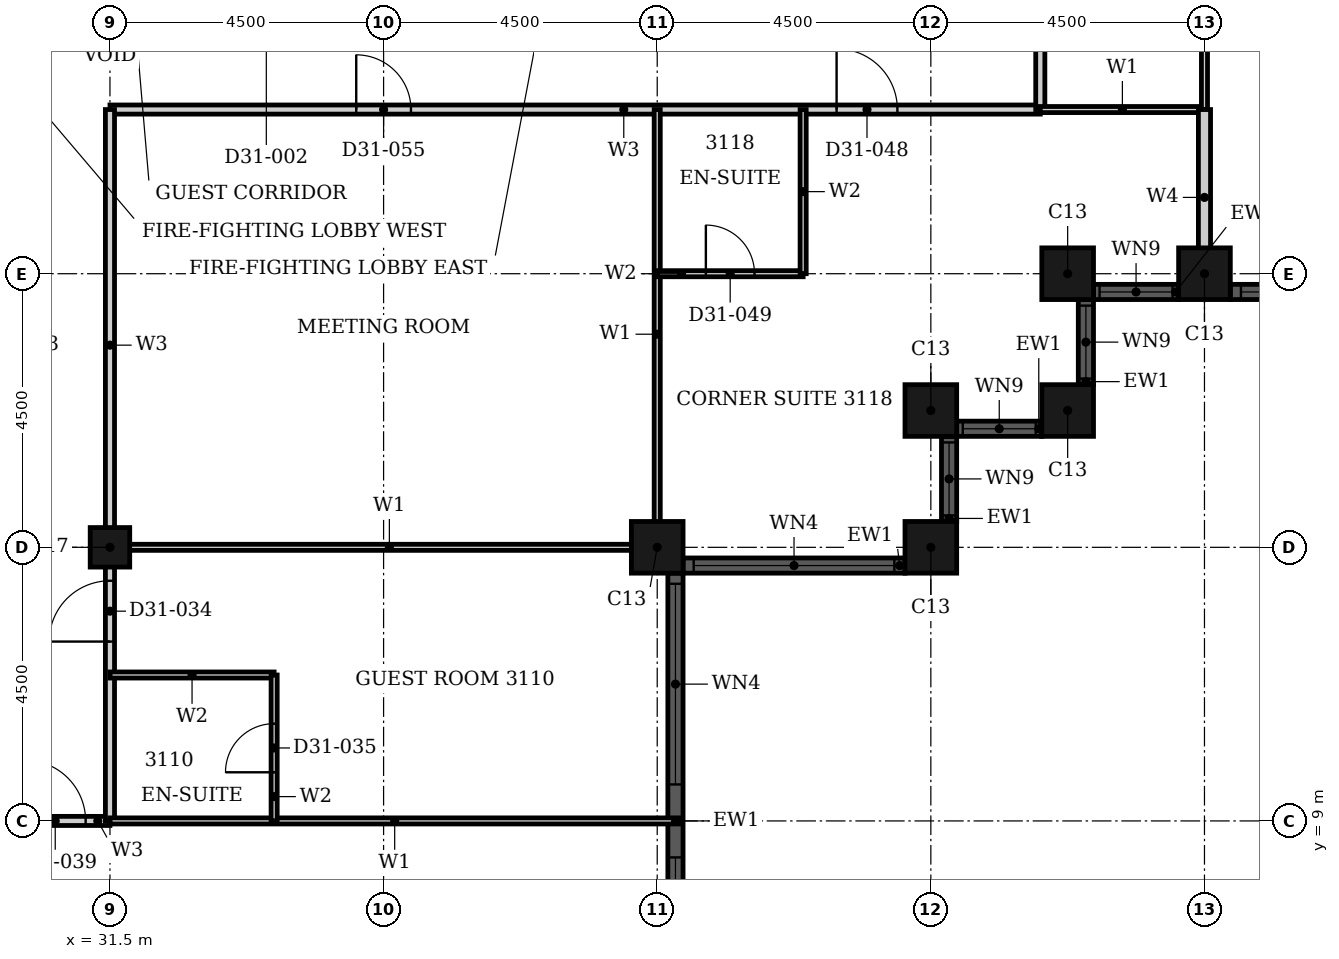
"""IFC4 building model, lengths in metres.
Left out: names, types, materials, properties, quantities, classifications, styles, units other than length and angle.
Written with IfcOpenShell. Run it as: python <this file> out.ifc"""

import sys

from ifc_helpers import new_model, si_unit, direction, frame, frame_2d, origin, origin_2d, place, context, subcontext, project, spatial, rectangle, hollow_rectangle, extrude, element, fill, save


model = new_model("IFC4")
c1 = context("Model", 3, precision=1e-05, world=origin(), true_north=direction((0.0, 1.0)))
c2 = subcontext(c1, "Body", "Model", "MODEL_VIEW")
j1 = project(units=[si_unit("LENGTHUNIT", "METRE"), si_unit("PLANEANGLEUNIT", "RADIAN")], contexts=[c1])
p1 = place(None, origin())
s1 = spatial("IfcSite", under=j1, at=p1, CompositionType="ELEMENT")
p2 = place(p1, origin())
s2 = spatial("IfcBuilding", under=s1, at=p2, CompositionType="ELEMENT")
p3 = place(p2, frame((0.0, 0.0, 126.0)))
s3 = spatial("IfcBuildingStorey", under=s2, at=p3, CompositionType="ELEMENT", Elevation=126.0)
for number, where, z_axis, x_axis in (
    (1, (40.5, 13.5, 0.0), (0.0, 0.0, 1.0), (1.0, 0.0, 0.0)),
    (2, (45.0, 13.5, 0.0), (0.0, 0.0, 1.0), (1.0, 0.0, 0.0)),
    (3, (45.0, 15.75, 0.0), (0.0, 0.0, 1.0), (1.0, 0.0, 0.0)),
    (4, (47.25, 15.75, 0.0), (0.0, 0.0, 1.0), (1.0, 0.0, 0.0)),
    (5, (47.25, 18.0, 0.0), (0.0, 0.0, 1.0), (1.0, 0.0, 0.0)),
    (6, (49.5, 18.0, 0.0), (0.0, 0.0, 1.0), (1.0, 0.0, 0.0)),
):
    element("IfcColumn", number, at=place(p3, frame(where, z_axis=z_axis, x_axis=x_axis)), inside=s3, PredefinedType="COLUMN", context=c2, shape_type="SweptSolid", body=[
        extrude(hollow_rectangle(XDim=0.85, YDim=0.85, WallThickness=0.026, at=origin_2d()), origin(), (0.0, 0.0, 1.0), 3.6),
    ])
p4 = place(p3, frame((31.5, 13.5, 0.0), z_axis=(0.0, 0.0, 1.0), x_axis=(1.0, 0.0, 0.0)))
e7 = element("IfcColumn", 7, at=p4, inside=s3, PredefinedType="COLUMN", context=c2, shape_type="SweptSolid", body=[
    extrude(hollow_rectangle(XDim=0.65, YDim=0.65, WallThickness=0.021, at=origin_2d()), origin(), (0.0, 0.0, 1.0), 3.6),
])
p5 = place(p3, frame((40.8, 4.925, 0.0), z_axis=(0.0, 0.0, 1.0), x_axis=(0.0, 1.0, 0.0)))
e8 = element("IfcWall", 8, at=p5, inside=s3, PredefinedType="SOLIDWALL", context=c2, shape_type="SweptSolid", body=[
    extrude(rectangle(XDim=8.15, YDim=0.25, at=frame_2d((4.075, 0.0))), origin(), (0.0, 0.0, 1.0), 3.6),
])
p6 = place(p5, frame((0.175, 0.0, 0.9)))
e9 = element("IfcOpeningElement", 9, at=p6, cuts=e8, PredefinedType="OPENING", context=c2, shape_type="SweptSolid", body=[
    extrude(rectangle(XDim=3.3, YDim=2.08, at=frame_2d((1.65, 1.04))), frame((0.0, 0.135, 0.0), z_axis=(0.0, -1.0, 0.0), x_axis=(1.0, 0.0, 0.0)), (0.0, 0.0, 1.0), 0.27),
])
p7 = place(p5, frame((4.675, 0.0, 0.9)))
e10 = element("IfcOpeningElement", 10, at=p7, cuts=e8, PredefinedType="OPENING", context=c2, shape_type="SweptSolid", body=[
    extrude(rectangle(XDim=3.3, YDim=2.08, at=frame_2d((1.65, 1.04))), frame((0.0, 0.135, 0.0), z_axis=(0.0, -1.0, 0.0), x_axis=(1.0, 0.0, 0.0)), (0.0, 0.0, 1.0), 0.27),
])
p8 = place(p3, frame((40.925, 13.2, 0.0), z_axis=(0.0, 0.0, 1.0), x_axis=(1.0, 0.0, 0.0)))
e11 = element("IfcWall", 11, at=p8, inside=s3, PredefinedType="SOLIDWALL", context=c2, shape_type="SweptSolid", body=[
    extrude(rectangle(XDim=3.65, YDim=0.25, at=frame_2d((1.825, 0.0))), origin(), (0.0, 0.0, 1.0), 3.6),
])
p9 = place(p8, frame((0.175, 0.0, 0.9)))
e12 = element("IfcOpeningElement", 12, at=p9, cuts=e11, PredefinedType="OPENING", context=c2, shape_type="SweptSolid", body=[
    extrude(rectangle(XDim=3.3, YDim=2.08, at=frame_2d((1.65, 1.04))), frame((0.0, 0.135, 0.0), z_axis=(0.0, -1.0, 0.0), x_axis=(1.0, 0.0, 0.0)), (0.0, 0.0, 1.0), 0.27),
])
p10 = place(p3, frame((45.3, 13.925, 0.0), z_axis=(0.0, 0.0, 1.0), x_axis=(0.0, 1.0, 0.0)))
e13 = element("IfcWall", 13, at=p10, inside=s3, PredefinedType="SOLIDWALL", context=c2, shape_type="SweptSolid", body=[
    extrude(rectangle(XDim=1.4, YDim=0.25, at=frame_2d((0.7, 0.0))), origin(), (0.0, 0.0, 1.0), 3.6),
])
p11 = place(p10, frame((0.1, 0.0, 0.9)))
e14 = element("IfcOpeningElement", 14, at=p11, cuts=e13, PredefinedType="OPENING", context=c2, shape_type="SweptSolid", body=[
    extrude(rectangle(XDim=1.2, YDim=2.08, at=frame_2d((0.6, 1.04))), frame((0.0, 0.135, 0.0), z_axis=(0.0, -1.0, 0.0), x_axis=(1.0, 0.0, 0.0)), (0.0, 0.0, 1.0), 0.27),
])
p12 = place(p3, frame((45.425, 15.45, 0.0), z_axis=(0.0, 0.0, 1.0), x_axis=(1.0, 0.0, 0.0)))
e15 = element("IfcWall", 15, at=p12, inside=s3, PredefinedType="SOLIDWALL", context=c2, shape_type="SweptSolid", body=[
    extrude(rectangle(XDim=1.4, YDim=0.25, at=frame_2d((0.7, 0.0))), origin(), (0.0, 0.0, 1.0), 3.6),
])
p13 = place(p12, frame((0.1, 0.0, 0.9)))
e16 = element("IfcOpeningElement", 16, at=p13, cuts=e15, PredefinedType="OPENING", context=c2, shape_type="SweptSolid", body=[
    extrude(rectangle(XDim=1.2, YDim=2.08, at=frame_2d((0.6, 1.04))), frame((0.0, 0.135, 0.0), z_axis=(0.0, -1.0, 0.0), x_axis=(1.0, 0.0, 0.0)), (0.0, 0.0, 1.0), 0.27),
])
p14 = place(p3, frame((47.55, 16.175, 0.0), z_axis=(0.0, 0.0, 1.0), x_axis=(0.0, 1.0, 0.0)))
e17 = element("IfcWall", 17, at=p14, inside=s3, PredefinedType="SOLIDWALL", context=c2, shape_type="SweptSolid", body=[
    extrude(rectangle(XDim=1.4, YDim=0.25, at=frame_2d((0.7, 0.0))), origin(), (0.0, 0.0, 1.0), 3.6),
])
p15 = place(p14, frame((0.1, 0.0, 0.9)))
e18 = element("IfcOpeningElement", 18, at=p15, cuts=e17, PredefinedType="OPENING", context=c2, shape_type="SweptSolid", body=[
    extrude(rectangle(XDim=1.2, YDim=2.08, at=frame_2d((0.6, 1.04))), frame((0.0, 0.135, 0.0), z_axis=(0.0, -1.0, 0.0), x_axis=(1.0, 0.0, 0.0)), (0.0, 0.0, 1.0), 0.27),
])
p16 = place(p3, frame((47.675, 17.7, 0.0), z_axis=(0.0, 0.0, 1.0), x_axis=(1.0, 0.0, 0.0)))
e19 = element("IfcWall", 19, at=p16, inside=s3, PredefinedType="SOLIDWALL", context=c2, shape_type="SweptSolid", body=[
    extrude(rectangle(XDim=1.4, YDim=0.25, at=frame_2d((0.7, 0.0))), origin(), (0.0, 0.0, 1.0), 3.6),
])
p17 = place(p16, frame((0.1, 0.0, 0.9)))
e20 = element("IfcOpeningElement", 20, at=p17, cuts=e19, PredefinedType="OPENING", context=c2, shape_type="SweptSolid", body=[
    extrude(rectangle(XDim=1.2, YDim=2.08, at=frame_2d((0.6, 1.04))), frame((0.0, 0.135, 0.0), z_axis=(0.0, -1.0, 0.0), x_axis=(1.0, 0.0, 0.0)), (0.0, 0.0, 1.0), 0.27),
])
p18 = place(p3, frame((49.925, 17.7, 0.0), z_axis=(0.0, 0.0, 1.0), x_axis=(1.0, 0.0, 0.0)))
e21 = element("IfcWall", 21, at=p18, inside=s3, PredefinedType="SOLIDWALL", context=c2, shape_type="SweptSolid", body=[
    extrude(rectangle(XDim=8.15, YDim=0.25, at=frame_2d((4.075, 0.0))), origin(), (0.0, 0.0, 1.0), 3.6),
])
p19 = place(p18, frame((0.175, 0.0, 0.9)))
e22 = element("IfcOpeningElement", 22, at=p19, cuts=e21, PredefinedType="OPENING", context=c2, shape_type="SweptSolid", body=[
    extrude(rectangle(XDim=3.3, YDim=2.08, at=frame_2d((1.65, 1.04))), frame((0.0, 0.135, 0.0), z_axis=(0.0, -1.0, 0.0), x_axis=(1.0, 0.0, 0.0)), (0.0, 0.0, 1.0), 0.27),
])
p20 = place(p18, frame((4.675, 0.0, 0.9)))
e23 = element("IfcOpeningElement", 23, at=p20, cuts=e21, PredefinedType="OPENING", context=c2, shape_type="SweptSolid", body=[
    extrude(rectangle(XDim=3.3, YDim=2.08, at=frame_2d((1.65, 1.04))), frame((0.0, 0.135, 0.0), z_axis=(0.0, -1.0, 0.0), x_axis=(1.0, 0.0, 0.0)), (0.0, 0.0, 1.0), 0.27),
])
p21 = place(p3, frame((31.5, 20.7, 0.0), z_axis=(0.0, 0.0, 1.0), x_axis=(1.0, 0.0, 0.0)))
e24 = element("IfcWall", 24, at=p21, inside=s3, PredefinedType="PARTITIONING", context=c2, shape_type="SweptSolid", body=[
    extrude(rectangle(XDim=15.3, YDim=0.15, at=frame_2d((7.65, 0.0))), origin(), (0.0, 0.0, 1.0), 3.3),
])
p22 = place(p21, frame((11.95, 0.0, 0.0)))
e25 = element("IfcOpeningElement", 25, at=p22, cuts=e24, PredefinedType="OPENING", context=c2, shape_type="SweptSolid", body=[
    extrude(rectangle(XDim=1.0, YDim=2.1, at=frame_2d((0.5, 1.05))), frame((0.0, 0.085, 0.0), z_axis=(0.0, -1.0, 0.0), x_axis=(1.0, 0.0, 0.0)), (0.0, 0.0, 1.0), 0.17),
])
p23 = place(p21, frame((4.05, 0.0, 0.0)))
e26 = element("IfcOpeningElement", 26, at=p23, cuts=e24, PredefinedType="OPENING", context=c2, shape_type="SweptSolid", body=[
    extrude(rectangle(XDim=0.9, YDim=2.1, at=frame_2d((0.45, 1.05))), frame((0.0, 0.085, 0.0), z_axis=(0.0, -1.0, 0.0), x_axis=(1.0, 0.0, 0.0)), (0.0, 0.0, 1.0), 0.17),
])
p24 = place(p3, frame((29.7, 9.0, 0.0), z_axis=(0.0, 0.0, 1.0), x_axis=(1.0, 0.0, 0.0)))
e27 = element("IfcWall", 27, at=p24, inside=s3, PredefinedType="PARTITIONING", context=c2, shape_type="SweptSolid", body=[
    extrude(rectangle(XDim=1.8, YDim=0.15, at=frame_2d((0.9, 0.0))), origin(), (0.0, 0.0, 1.0), 3.3),
])
p25 = place(p24, frame((0.4, 0.0, 0.0)))
e28 = element("IfcOpeningElement", 28, at=p25, cuts=e27, PredefinedType="OPENING", context=c2, shape_type="SweptSolid", body=[
    extrude(rectangle(XDim=1.0, YDim=2.1, at=frame_2d((0.5, 1.05))), frame((0.0, 0.085, 0.0), z_axis=(0.0, -1.0, 0.0), x_axis=(1.0, 0.0, 0.0)), (0.0, 0.0, 1.0), 0.17),
])
p26 = place(p3, frame((31.5, 9.0, 0.0), z_axis=(0.0, 0.0, 1.0), x_axis=(0.0, 1.0, 0.0)))
e29 = element("IfcWall", 29, at=p26, inside=s3, PredefinedType="PARTITIONING", context=c2, shape_type="SweptSolid", body=[
    extrude(rectangle(XDim=11.7, YDim=0.15, at=frame_2d((5.85, 0.0))), origin(), (0.0, 0.0, 1.0), 2.58),
])
p27 = place(p26, frame((2.95, 0.0, 0.0)))
e30 = element("IfcOpeningElement", 30, at=p27, cuts=e29, PredefinedType="OPENING", context=c2, shape_type="SweptSolid", body=[
    extrude(rectangle(XDim=1.0, YDim=2.1, at=frame_2d((0.5, 1.05))), frame((0.0, 0.085, 0.0), z_axis=(0.0, -1.0, 0.0), x_axis=(1.0, 0.0, 0.0)), (0.0, 0.0, 1.0), 0.17),
])
p28 = place(p3, frame((46.8, 20.7, 0.0), z_axis=(0.0, 0.0, 1.0), x_axis=(0.0, 1.0, 0.0)))
e31 = element("IfcWall", 31, at=p28, inside=s3, PredefinedType="PARTITIONING", context=c2, shape_type="SweptSolid", body=[
    extrude(rectangle(XDim=6.3, YDim=0.15, at=frame_2d((3.15, 0.0))), origin(), (0.0, 0.0, 1.0), 3.3),
])
p29 = place(p28, frame((2.65, 0.0, 0.0)))
e32 = element("IfcOpeningElement", 32, at=p29, cuts=e31, PredefinedType="OPENING", context=c2, shape_type="SweptSolid", body=[
    extrude(rectangle(XDim=0.9, YDim=2.1, at=frame_2d((0.45, 1.05))), frame((0.0, 0.085, 0.0), z_axis=(0.0, -1.0, 0.0), x_axis=(1.0, 0.0, 0.0)), (0.0, 0.0, 1.0), 0.17),
])
p30 = place(p3, frame((31.5, 13.5, 0.0), z_axis=(0.0, 0.0, 1.0), x_axis=(1.0, 0.0, 0.0)))
e33 = element("IfcWall", 33, at=p30, inside=s3, PredefinedType="PARTITIONING", context=c2, shape_type="SweptSolid", body=[
    extrude(rectangle(XDim=9.19, YDim=0.1, at=frame_2d((4.595, 0.0))), origin(), (0.0, 0.0, 1.0), 2.38),
])
p31 = place(p3, frame((46.8, 20.7, 0.0), z_axis=(0.0, 0.0, 1.0), x_axis=(1.0, 0.0, 0.0)))
e34 = element("IfcWall", 34, at=p31, inside=s3, PredefinedType="PARTITIONING", context=c2, shape_type="SweptSolid", body=[
    extrude(rectangle(XDim=2.7, YDim=0.1, at=frame_2d((1.35, 0.0))), origin(), (0.0, 0.0, 1.0), 3.3),
])
p32 = place(p3, frame((31.5, 9.0, 0.0), z_axis=(0.0, 0.0, 1.0), x_axis=(1.0, 0.0, 0.0)))
e35 = element("IfcWall", 35, at=p32, inside=s3, PredefinedType="PARTITIONING", context=c2, shape_type="SweptSolid", body=[
    extrude(rectangle(XDim=9.365, YDim=0.1, at=frame_2d((4.683, 0.0))), origin(), (0.0, 0.0, 1.0), 3.3),
])
p33 = place(p3, frame((40.5, 13.31, 0.0), z_axis=(0.0, 0.0, 1.0), x_axis=(0.0, 1.0, 0.0)))
e36 = element("IfcWall", 36, at=p33, inside=s3, PredefinedType="PARTITIONING", context=c2, shape_type="SweptSolid", body=[
    extrude(rectangle(XDim=7.39, YDim=0.1, at=frame_2d((3.695, 0.0))), origin(), (0.0, 0.0, 1.0), 3.3),
])
p34 = place(p3, frame((49.5, 20.7, 0.0), z_axis=(0.0, 0.0, 1.0), x_axis=(0.0, 1.0, 0.0)))
e37 = element("IfcWall", 37, at=p34, inside=s3, PredefinedType="PARTITIONING", context=c2, shape_type="SweptSolid", body=[
    extrude(rectangle(XDim=6.3, YDim=0.1, at=frame_2d((3.15, 0.0))), origin(), (0.0, 0.0, 1.0), 2.38),
])
p35 = place(p3, frame((49.5, 17.81, 0.0), z_axis=(0.0, 0.0, 1.0), x_axis=(0.0, 1.0, 0.0)))
e38 = element("IfcWall", 38, at=p35, inside=s3, PredefinedType="PARTITIONING", context=c2, shape_type="SweptSolid", body=[
    extrude(rectangle(XDim=2.89, YDim=0.2, at=frame_2d((1.445, 0.0))), origin(), (0.0, 0.0, 1.0), 2.38),
])
p36 = place(p3, frame((31.5, 11.4, 0.0), z_axis=(0.0, 0.0, 1.0), x_axis=(1.0, 0.0, 0.0)))
e39 = element("IfcWall", 39, at=p36, inside=s3, PredefinedType="PARTITIONING", context=c2, shape_type="SweptSolid", body=[
    extrude(rectangle(XDim=2.7, YDim=0.1, at=frame_2d((1.35, 0.0))), origin(), (0.0, 0.0, 1.0), 3.3),
])
p37 = place(p3, frame((40.5, 18.0, 0.0), z_axis=(0.0, 0.0, 1.0), x_axis=(1.0, 0.0, 0.0)))
e40 = element("IfcWall", 40, at=p37, inside=s3, PredefinedType="PARTITIONING", context=c2, shape_type="SweptSolid", body=[
    extrude(rectangle(XDim=2.4, YDim=0.1, at=frame_2d((1.2, 0.0))), origin(), (0.0, 0.0, 1.0), 3.3),
])
p38 = place(p37, frame((0.8, 0.0, 0.0)))
e41 = element("IfcOpeningElement", 41, at=p38, cuts=e40, PredefinedType="OPENING", context=c2, shape_type="SweptSolid", body=[
    extrude(rectangle(XDim=0.8, YDim=2.1, at=frame_2d((0.4, 1.05))), frame((0.0, 0.06, 0.0), z_axis=(0.0, -1.0, 0.0), x_axis=(1.0, 0.0, 0.0)), (0.0, 0.0, 1.0), 0.12),
])
p39 = place(p3, frame((34.2, 9.0, 0.0), z_axis=(0.0, 0.0, 1.0), x_axis=(0.0, 1.0, 0.0)))
e42 = element("IfcWall", 42, at=p39, inside=s3, PredefinedType="PARTITIONING", context=c2, shape_type="SweptSolid", body=[
    extrude(rectangle(XDim=2.4, YDim=0.1, at=frame_2d((1.2, 0.0))), origin(), (0.0, 0.0, 1.0), 3.3),
])
p40 = place(p39, frame((0.8, 0.0, 0.0)))
e43 = element("IfcOpeningElement", 43, at=p40, cuts=e42, PredefinedType="OPENING", context=c2, shape_type="SweptSolid", body=[
    extrude(rectangle(XDim=0.8, YDim=2.1, at=frame_2d((0.4, 1.05))), frame((0.0, 0.06, 0.0), z_axis=(0.0, -1.0, 0.0), x_axis=(1.0, 0.0, 0.0)), (0.0, 0.0, 1.0), 0.12),
])
p41 = place(p3, frame((42.9, 18.0, 0.0), z_axis=(0.0, 0.0, 1.0), x_axis=(0.0, 1.0, 0.0)))
e44 = element("IfcWall", 44, at=p41, inside=s3, PredefinedType="PARTITIONING", context=c2, shape_type="SweptSolid", body=[
    extrude(rectangle(XDim=2.7, YDim=0.1, at=frame_2d((1.35, 0.0))), origin(), (0.0, 0.0, 1.0), 3.3),
])
p42 = place(p6, origin())
e45 = element("IfcWindow", 45, at=p42, inside=s3, PartitioningType="SINGLE_PANEL", PredefinedType="WINDOW", context=c2, shape_type="SweptSolid", body=[
    extrude(rectangle(XDim=3.3, YDim=2.08, at=frame_2d((1.65, 1.04))), frame((0.0, 0.03, 0.0), z_axis=(0.0, -1.0, 0.0), x_axis=(1.0, 0.0, 0.0)), (0.0, 0.0, 1.0), 0.06),
])
fill(e9, e45)
p43 = place(p7, origin())
e46 = element("IfcWindow", 46, at=p43, inside=s3, PartitioningType="SINGLE_PANEL", PredefinedType="WINDOW", context=c2, shape_type="SweptSolid", body=[
    extrude(rectangle(XDim=3.3, YDim=2.08, at=frame_2d((1.65, 1.04))), frame((0.0, 0.03, 0.0), z_axis=(0.0, -1.0, 0.0), x_axis=(1.0, 0.0, 0.0)), (0.0, 0.0, 1.0), 0.06),
])
fill(e10, e46)
p44 = place(p9, origin())
e47 = element("IfcWindow", 47, at=p44, inside=s3, PartitioningType="SINGLE_PANEL", PredefinedType="WINDOW", context=c2, shape_type="SweptSolid", body=[
    extrude(rectangle(XDim=3.3, YDim=2.08, at=frame_2d((1.65, 1.04))), frame((0.0, 0.03, 0.0), z_axis=(0.0, -1.0, 0.0), x_axis=(1.0, 0.0, 0.0)), (0.0, 0.0, 1.0), 0.06),
])
fill(e12, e47)
p45 = place(p11, origin())
e48 = element("IfcWindow", 48, at=p45, inside=s3, PartitioningType="SINGLE_PANEL", PredefinedType="WINDOW", context=c2, shape_type="SweptSolid", body=[
    extrude(rectangle(XDim=1.2, YDim=2.08, at=frame_2d((0.6, 1.04))), frame((0.0, 0.03, 0.0), z_axis=(0.0, -1.0, 0.0), x_axis=(1.0, 0.0, 0.0)), (0.0, 0.0, 1.0), 0.06),
])
fill(e14, e48)
p46 = place(p13, origin())
e49 = element("IfcWindow", 49, at=p46, inside=s3, PartitioningType="SINGLE_PANEL", PredefinedType="WINDOW", context=c2, shape_type="SweptSolid", body=[
    extrude(rectangle(XDim=1.2, YDim=2.08, at=frame_2d((0.6, 1.04))), frame((0.0, 0.03, 0.0), z_axis=(0.0, -1.0, 0.0), x_axis=(1.0, 0.0, 0.0)), (0.0, 0.0, 1.0), 0.06),
])
fill(e16, e49)
p47 = place(p15, origin())
e50 = element("IfcWindow", 50, at=p47, inside=s3, PartitioningType="SINGLE_PANEL", PredefinedType="WINDOW", context=c2, shape_type="SweptSolid", body=[
    extrude(rectangle(XDim=1.2, YDim=2.08, at=frame_2d((0.6, 1.04))), frame((0.0, 0.03, 0.0), z_axis=(0.0, -1.0, 0.0), x_axis=(1.0, 0.0, 0.0)), (0.0, 0.0, 1.0), 0.06),
])
fill(e18, e50)
p48 = place(p17, origin())
e51 = element("IfcWindow", 51, at=p48, inside=s3, PartitioningType="SINGLE_PANEL", PredefinedType="WINDOW", context=c2, shape_type="SweptSolid", body=[
    extrude(rectangle(XDim=1.2, YDim=2.08, at=frame_2d((0.6, 1.04))), frame((0.0, 0.03, 0.0), z_axis=(0.0, -1.0, 0.0), x_axis=(1.0, 0.0, 0.0)), (0.0, 0.0, 1.0), 0.06),
])
fill(e20, e51)
p49 = place(p19, origin())
e52 = element("IfcWindow", 52, at=p49, inside=s3, PartitioningType="SINGLE_PANEL", PredefinedType="WINDOW", context=c2, shape_type="SweptSolid", body=[
    extrude(rectangle(XDim=3.3, YDim=2.08, at=frame_2d((1.65, 1.04))), frame((0.0, 0.03, 0.0), z_axis=(0.0, -1.0, 0.0), x_axis=(1.0, 0.0, 0.0)), (0.0, 0.0, 1.0), 0.06),
])
fill(e22, e52)
p50 = place(p27, origin())
e53 = element("IfcDoor", 53, at=p50, inside=s3, OperationType="SINGLE_SWING_RIGHT", PredefinedType="DOOR", context=c2, shape_type="SweptSolid", body=[
    extrude(rectangle(XDim=1.0, YDim=2.1, at=frame_2d((0.5, 1.05))), frame((0.0, 0.025, 0.0), z_axis=(0.0, -1.0, 0.0), x_axis=(1.0, 0.0, 0.0)), (0.0, 0.0, 1.0), 0.05),
])
fill(e30, e53)
p51 = place(p40, origin())
e54 = element("IfcDoor", 54, at=p51, inside=s3, OperationType="SINGLE_SWING_RIGHT", PredefinedType="DOOR", context=c2, shape_type="SweptSolid", body=[
    extrude(rectangle(XDim=0.8, YDim=2.1, at=frame_2d((0.4, 1.05))), frame((0.0, 0.025, 0.0), z_axis=(0.0, -1.0, 0.0), x_axis=(1.0, 0.0, 0.0)), (0.0, 0.0, 1.0), 0.05),
])
fill(e43, e54)
p52 = place(p25, origin())
e55 = element("IfcDoor", 55, at=p52, inside=s3, OperationType="SINGLE_SWING_LEFT", PredefinedType="DOOR", context=c2, shape_type="SweptSolid", body=[
    extrude(rectangle(XDim=1.0, YDim=2.1, at=frame_2d((0.5, 1.05))), frame((0.0, 0.025, 0.0), z_axis=(0.0, -1.0, 0.0), x_axis=(1.0, 0.0, 0.0)), (0.0, 0.0, 1.0), 0.05),
])
fill(e28, e55)
p53 = place(p22, origin())
e56 = element("IfcDoor", 56, at=p53, inside=s3, OperationType="SINGLE_SWING_RIGHT", PredefinedType="DOOR", context=c2, shape_type="SweptSolid", body=[
    extrude(rectangle(XDim=1.0, YDim=2.1, at=frame_2d((0.5, 1.05))), frame((0.0, 0.025, 0.0), z_axis=(0.0, -1.0, 0.0), x_axis=(1.0, 0.0, 0.0)), (0.0, 0.0, 1.0), 0.05),
])
fill(e25, e56)
p54 = place(p38, origin())
e57 = element("IfcDoor", 57, at=p54, inside=s3, OperationType="SINGLE_SWING_RIGHT", PredefinedType="DOOR", context=c2, shape_type="SweptSolid", body=[
    extrude(rectangle(XDim=0.8, YDim=2.1, at=frame_2d((0.4, 1.05))), frame((0.0, 0.025, 0.0), z_axis=(0.0, -1.0, 0.0), x_axis=(1.0, 0.0, 0.0)), (0.0, 0.0, 1.0), 0.05),
])
fill(e41, e57)
p55 = place(p23, origin())
e58 = element("IfcDoor", 58, at=p55, inside=s3, OperationType="SINGLE_SWING_RIGHT", PredefinedType="DOOR", context=c2, shape_type="SweptSolid", body=[
    extrude(rectangle(XDim=0.9, YDim=2.1, at=frame_2d((0.45, 1.05))), frame((0.0, 0.025, 0.0), z_axis=(0.0, -1.0, 0.0), x_axis=(1.0, 0.0, 0.0)), (0.0, 0.0, 1.0), 0.05),
])
fill(e26, e58)
save(model, sys.argv[1])
